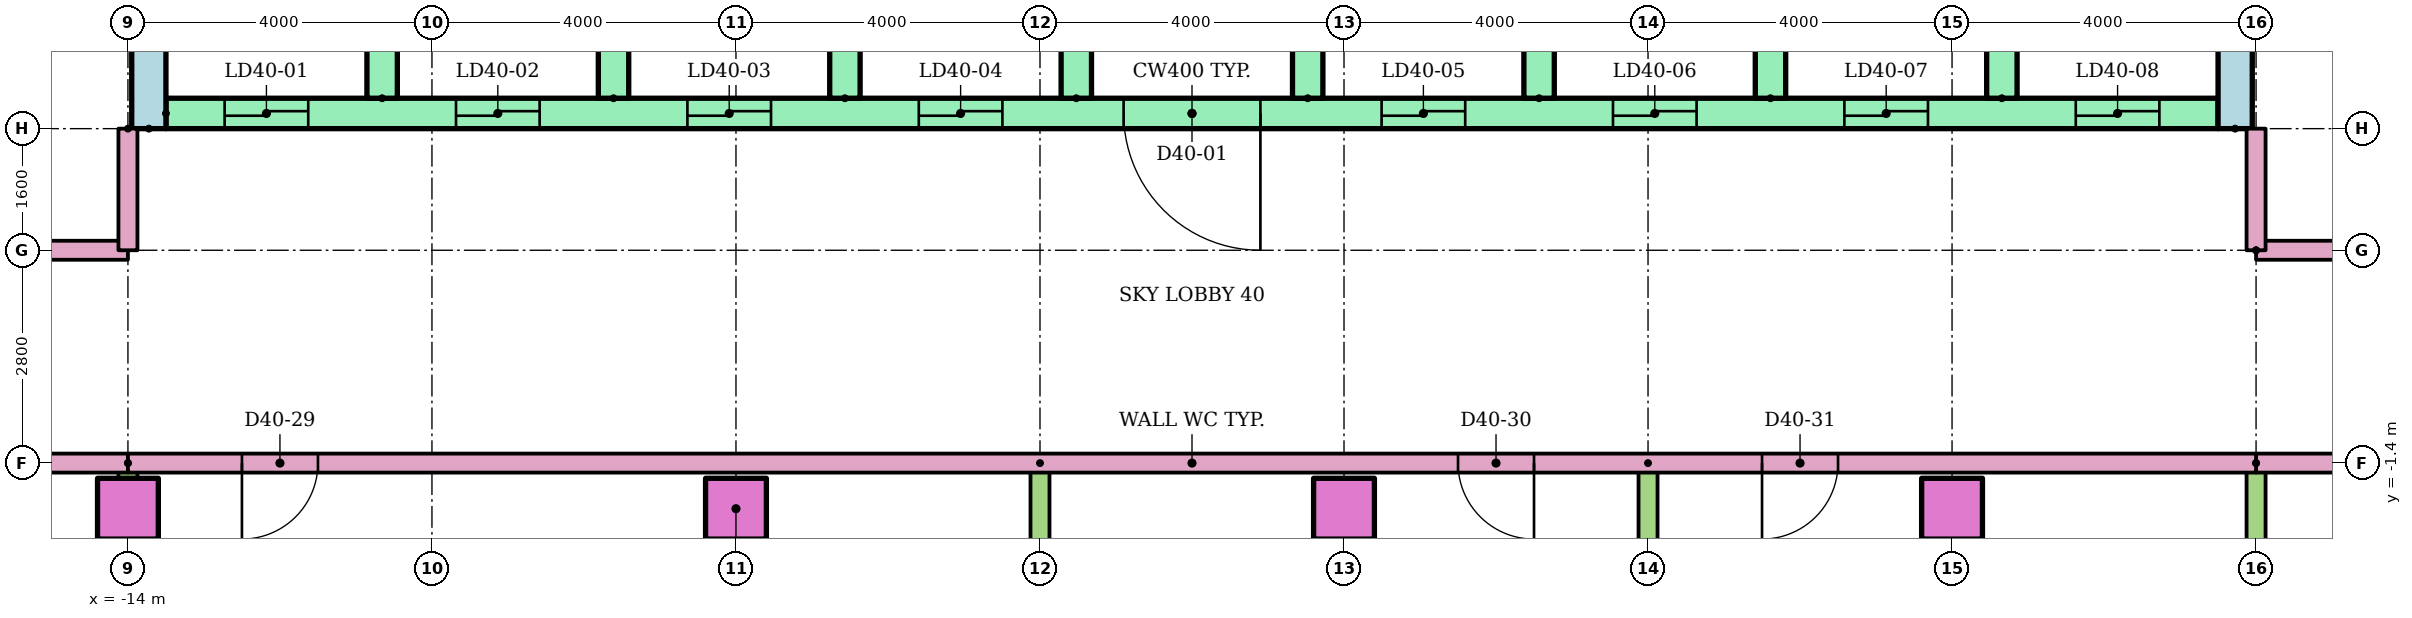
"""IFC4 building model, lengths in metres.
Left out: names, types, materials, properties, quantities, classifications, styles, units other than length and angle.
Written with IfcOpenShell. Run it as: python <this file> out.ifc"""

import sys

from ifc_helpers import new_model, si_unit, direction, frame, frame_2d, origin, origin_2d, place, context, subcontext, project, spatial, rectangle, extrude, element, fill, save


model = new_model("IFC4")
c1 = context("Model", 3, precision=1e-05, world=origin(), true_north=direction((0.0, 1.0)))
c2 = subcontext(c1, "Body", "Model", "MODEL_VIEW")
j1 = project(units=[si_unit("LENGTHUNIT", "METRE"), si_unit("PLANEANGLEUNIT", "RADIAN")], contexts=[c1])
p1 = place(None, origin())
s1 = spatial("IfcSite", under=j1, at=p1, CompositionType="ELEMENT")
p2 = place(p1, origin())
s2 = spatial("IfcBuilding", under=s1, at=p2, CompositionType="ELEMENT")
p3 = place(p2, frame((0.0, 0.0, 151.8)))
s3 = spatial("IfcBuildingStorey", under=s2, at=p3, CompositionType="ELEMENT", Elevation=151.8)
for number, where in (
    (1, (-14.0, -2.0, 0.0)),
    (2, (-6.0, -2.0, 0.0)),
    (3, (2.0, -2.0, 0.0)),
    (4, (10.0, -2.0, 0.0)),
):
    element("IfcColumn", number, at=place(p3, frame(where)), inside=s3, PredefinedType="COLUMN", context=c2, shape_type="SweptSolid", body=[
        extrude(rectangle(XDim=0.8, YDim=0.8, at=origin_2d()), origin(), (0.0, 0.0, 1.0), 9.6),
    ])
for number, where, z_axis, x_axis in (
    (5, (-13.725, 3.0, 0.0), (0.0, 0.0, 1.0), (0.0, 1.0, 0.0)),
    (6, (13.725, 3.0, 0.0), (0.0, 0.0, 1.0), (0.0, 1.0, 0.0)),
):
    element("IfcWall", number, at=place(p3, frame(where, z_axis=z_axis, x_axis=x_axis)), inside=s3, PredefinedType="SHEAR", context=c2, shape_type="SweptSolid", body=[
        extrude(rectangle(XDim=17.0, YDim=0.45, at=frame_2d((8.5, 0.0))), origin(), (0.0, 0.0, 1.0), 8.8),
    ])
p4 = place(p3, frame((-13.5, 3.2, 0.0)))
e7 = element("IfcWall", 7, at=p4, inside=s3, PredefinedType="SHEAR", context=c2, shape_type="SweptSolid", body=[
    extrude(rectangle(XDim=27.0, YDim=0.4, at=frame_2d((13.5, 0.0))), origin(), (0.0, 0.0, 1.0), 8.8),
])
p5 = place(p4, frame((0.772, 0.0, 0.0)))
e8 = element("IfcOpeningElement", 8, at=p5, cuts=e7, PredefinedType="OPENING", context=c2, shape_type="SweptSolid", body=[
    extrude(rectangle(XDim=1.1, YDim=2.1, at=frame_2d((0.55, 1.05))), frame((0.0, 0.21, 0.0), z_axis=(0.0, -1.0, 0.0), x_axis=(1.0, 0.0, 0.0)), (0.0, 0.0, 1.0), 0.42),
])
p6 = place(p4, frame((3.817, 0.0, 0.0)))
e9 = element("IfcOpeningElement", 9, at=p6, cuts=e7, PredefinedType="OPENING", context=c2, shape_type="SweptSolid", body=[
    extrude(rectangle(XDim=1.1, YDim=2.1, at=frame_2d((0.55, 1.05))), frame((0.0, 0.21, 0.0), z_axis=(0.0, -1.0, 0.0), x_axis=(1.0, 0.0, 0.0)), (0.0, 0.0, 1.0), 0.42),
])
p7 = place(p4, frame((6.861, 0.0, 0.0)))
e10 = element("IfcOpeningElement", 10, at=p7, cuts=e7, PredefinedType="OPENING", context=c2, shape_type="SweptSolid", body=[
    extrude(rectangle(XDim=1.1, YDim=2.1, at=frame_2d((0.55, 1.05))), frame((0.0, 0.21, 0.0), z_axis=(0.0, -1.0, 0.0), x_axis=(1.0, 0.0, 0.0)), (0.0, 0.0, 1.0), 0.42),
])
p8 = place(p4, frame((9.906, 0.0, 0.0)))
e11 = element("IfcOpeningElement", 11, at=p8, cuts=e7, PredefinedType="OPENING", context=c2, shape_type="SweptSolid", body=[
    extrude(rectangle(XDim=1.1, YDim=2.1, at=frame_2d((0.55, 1.05))), frame((0.0, 0.21, 0.0), z_axis=(0.0, -1.0, 0.0), x_axis=(1.0, 0.0, 0.0)), (0.0, 0.0, 1.0), 0.42),
])
p9 = place(p4, frame((15.994, 0.0, 0.0)))
e12 = element("IfcOpeningElement", 12, at=p9, cuts=e7, PredefinedType="OPENING", context=c2, shape_type="SweptSolid", body=[
    extrude(rectangle(XDim=1.1, YDim=2.1, at=frame_2d((0.55, 1.05))), frame((0.0, 0.21, 0.0), z_axis=(0.0, -1.0, 0.0), x_axis=(1.0, 0.0, 0.0)), (0.0, 0.0, 1.0), 0.42),
])
p10 = place(p4, frame((19.039, 0.0, 0.0)))
e13 = element("IfcOpeningElement", 13, at=p10, cuts=e7, PredefinedType="OPENING", context=c2, shape_type="SweptSolid", body=[
    extrude(rectangle(XDim=1.1, YDim=2.1, at=frame_2d((0.55, 1.05))), frame((0.0, 0.21, 0.0), z_axis=(0.0, -1.0, 0.0), x_axis=(1.0, 0.0, 0.0)), (0.0, 0.0, 1.0), 0.42),
])
p11 = place(p4, frame((22.083, 0.0, 0.0)))
e14 = element("IfcOpeningElement", 14, at=p11, cuts=e7, PredefinedType="OPENING", context=c2, shape_type="SweptSolid", body=[
    extrude(rectangle(XDim=1.1, YDim=2.1, at=frame_2d((0.55, 1.05))), frame((0.0, 0.21, 0.0), z_axis=(0.0, -1.0, 0.0), x_axis=(1.0, 0.0, 0.0)), (0.0, 0.0, 1.0), 0.42),
])
p12 = place(p4, frame((25.128, 0.0, 0.0)))
e15 = element("IfcOpeningElement", 15, at=p12, cuts=e7, PredefinedType="OPENING", context=c2, shape_type="SweptSolid", body=[
    extrude(rectangle(XDim=1.1, YDim=2.1, at=frame_2d((0.55, 1.05))), frame((0.0, 0.21, 0.0), z_axis=(0.0, -1.0, 0.0), x_axis=(1.0, 0.0, 0.0)), (0.0, 0.0, 1.0), 0.42),
])
p13 = place(p4, frame((12.6, 0.0, 0.0)))
e16 = element("IfcOpeningElement", 16, at=p13, cuts=e7, PredefinedType="OPENING", context=c2, shape_type="SweptSolid", body=[
    extrude(rectangle(XDim=1.8, YDim=2.1, at=frame_2d((0.9, 1.05))), frame((0.0, 0.21, 0.0), z_axis=(0.0, -1.0, 0.0), x_axis=(1.0, 0.0, 0.0)), (0.0, 0.0, 1.0), 0.42),
])
for number, where, z_axis, x_axis in (
    (17, (-10.656, 3.4, 0.0), (0.0, 0.0, 1.0), (0.0, 1.0, 0.0)),
    (18, (-7.611, 3.4, 0.0), (0.0, 0.0, 1.0), (0.0, 1.0, 0.0)),
    (19, (-4.567, 3.4, 0.0), (0.0, 0.0, 1.0), (0.0, 1.0, 0.0)),
    (20, (-1.522, 3.4, 0.0), (0.0, 0.0, 1.0), (0.0, 1.0, 0.0)),
    (21, (1.522, 3.4, 0.0), (0.0, 0.0, 1.0), (0.0, 1.0, 0.0)),
    (22, (4.567, 3.4, 0.0), (0.0, 0.0, 1.0), (0.0, 1.0, 0.0)),
    (23, (7.611, 3.4, 0.0), (0.0, 0.0, 1.0), (0.0, 1.0, 0.0)),
    (24, (10.656, 3.4, 0.0), (0.0, 0.0, 1.0), (0.0, 1.0, 0.0)),
):
    element("IfcWall", number, at=place(p3, frame(where, z_axis=z_axis, x_axis=x_axis)), inside=s3, PredefinedType="SHEAR", context=c2, shape_type="SweptSolid", body=[
        extrude(rectangle(XDim=3.0, YDim=0.4, at=frame_2d((1.5, 0.0))), origin(), (0.0, 0.0, 1.0), 8.8),
    ])
p14 = place(p3, frame((-14.0, -1.4, 0.0), z_axis=(0.0, 0.0, 1.0), x_axis=(-1.0, 0.0, 0.0)))
e25 = element("IfcWall", 25, at=p14, inside=s3, PredefinedType="PARTITIONING", context=c2, shape_type="SweptSolid", body=[
    extrude(rectangle(XDim=15.0, YDim=0.25, at=frame_2d((7.5, 0.0))), origin(), (0.0, 0.0, 1.0), 8.8),
])
p15 = place(p14, frame((1.5, 0.0, 0.0)))
e26 = element("IfcOpeningElement", 26, at=p15, cuts=e25, PredefinedType="OPENING", context=c2, shape_type="SweptSolid", body=[
    extrude(rectangle(XDim=1.0, YDim=2.1, at=frame_2d((0.5, 1.05))), frame((0.0, 0.135, 0.0), z_axis=(0.0, -1.0, 0.0), x_axis=(1.0, 0.0, 0.0)), (0.0, 0.0, 1.0), 0.27),
])
p16 = place(p14, frame((8.45, 0.0, 0.0)))
e27 = element("IfcOpeningElement", 27, at=p16, cuts=e25, PredefinedType="OPENING", context=c2, shape_type="SweptSolid", body=[
    extrude(rectangle(XDim=0.9, YDim=2.1, at=frame_2d((0.45, 1.05))), frame((0.0, 0.135, 0.0), z_axis=(0.0, -1.0, 0.0), x_axis=(1.0, 0.0, 0.0)), (0.0, 0.0, 1.0), 0.27),
])
p17 = place(p14, frame((13.5, 0.0, 0.0)))
e28 = element("IfcOpeningElement", 28, at=p17, cuts=e25, PredefinedType="OPENING", context=c2, shape_type="SweptSolid", body=[
    extrude(rectangle(XDim=1.0, YDim=2.1, at=frame_2d((0.5, 1.05))), frame((0.0, 0.135, 0.0), z_axis=(0.0, -1.0, 0.0), x_axis=(1.0, 0.0, 0.0)), (0.0, 0.0, 1.0), 0.27),
])
p18 = place(p3, frame((-14.0, -1.4, 0.0), z_axis=(0.0, 0.0, 1.0), x_axis=(0.0, -1.0, 0.0)))
e29 = element("IfcWall", 29, at=p18, inside=s3, PredefinedType="PARTITIONING", context=c2, shape_type="SweptSolid", body=[
    extrude(rectangle(XDim=14.921, YDim=0.25, at=frame_2d((7.46, 0.0))), origin(), (0.0, 0.0, 1.0), 8.8),
])
p19 = place(p3, frame((-29.0, 1.4, 0.0)))
e30 = element("IfcWall", 30, at=p19, inside=s3, PredefinedType="PARTITIONING", context=c2, shape_type="SweptSolid", body=[
    extrude(rectangle(XDim=15.0, YDim=0.25, at=frame_2d((7.5, 0.0))), origin(), (0.0, 0.0, 1.0), 8.8),
])
p20 = place(p19, frame((12.5, 0.0, 0.0)))
e31 = element("IfcOpeningElement", 31, at=p20, cuts=e30, PredefinedType="OPENING", context=c2, shape_type="SweptSolid", body=[
    extrude(rectangle(XDim=1.0, YDim=2.1, at=frame_2d((0.5, 1.05))), frame((0.0, 0.135, 0.0), z_axis=(0.0, -1.0, 0.0), x_axis=(1.0, 0.0, 0.0)), (0.0, 0.0, 1.0), 0.27),
])
p21 = place(p19, frame((0.5, 0.0, 0.0)))
e32 = element("IfcOpeningElement", 32, at=p21, cuts=e30, PredefinedType="OPENING", context=c2, shape_type="SweptSolid", body=[
    extrude(rectangle(XDim=1.0, YDim=2.1, at=frame_2d((0.5, 1.05))), frame((0.0, 0.135, 0.0), z_axis=(0.0, -1.0, 0.0), x_axis=(1.0, 0.0, 0.0)), (0.0, 0.0, 1.0), 0.27),
])
p22 = place(p3, frame((29.0, -1.4, 0.0), z_axis=(0.0, 0.0, 1.0), x_axis=(-1.0, 0.0, 0.0)))
e33 = element("IfcWall", 33, at=p22, inside=s3, PredefinedType="PARTITIONING", context=c2, shape_type="SweptSolid", body=[
    extrude(rectangle(XDim=15.0, YDim=0.25, at=frame_2d((7.5, 0.0))), origin(), (0.0, 0.0, 1.0), 8.8),
])
p23 = place(p22, frame((12.5, 0.0, 0.0)))
e34 = element("IfcOpeningElement", 34, at=p23, cuts=e33, PredefinedType="OPENING", context=c2, shape_type="SweptSolid", body=[
    extrude(rectangle(XDim=1.0, YDim=2.1, at=frame_2d((0.5, 1.05))), frame((0.0, 0.135, 0.0), z_axis=(0.0, -1.0, 0.0), x_axis=(1.0, 0.0, 0.0)), (0.0, 0.0, 1.0), 0.27),
])
p24 = place(p22, frame((0.5, 0.0, 0.0)))
e35 = element("IfcOpeningElement", 35, at=p24, cuts=e33, PredefinedType="OPENING", context=c2, shape_type="SweptSolid", body=[
    extrude(rectangle(XDim=1.0, YDim=2.1, at=frame_2d((0.5, 1.05))), frame((0.0, 0.135, 0.0), z_axis=(0.0, -1.0, 0.0), x_axis=(1.0, 0.0, 0.0)), (0.0, 0.0, 1.0), 0.27),
])
p25 = place(p3, frame((14.0, -1.4, 0.0), z_axis=(0.0, 0.0, 1.0), x_axis=(0.0, -1.0, 0.0)))
e36 = element("IfcWall", 36, at=p25, inside=s3, PredefinedType="PARTITIONING", context=c2, shape_type="SweptSolid", body=[
    extrude(rectangle(XDim=14.921, YDim=0.25, at=frame_2d((7.46, 0.0))), origin(), (0.0, 0.0, 1.0), 8.8),
])
p26 = place(p3, frame((14.0, 1.4, 0.0)))
e37 = element("IfcWall", 37, at=p26, inside=s3, PredefinedType="PARTITIONING", context=c2, shape_type="SweptSolid", body=[
    extrude(rectangle(XDim=15.0, YDim=0.25, at=frame_2d((7.5, 0.0))), origin(), (0.0, 0.0, 1.0), 8.8),
])
p27 = place(p26, frame((1.5, 0.0, 0.0)))
e38 = element("IfcOpeningElement", 38, at=p27, cuts=e37, PredefinedType="OPENING", context=c2, shape_type="SweptSolid", body=[
    extrude(rectangle(XDim=1.0, YDim=2.1, at=frame_2d((0.5, 1.05))), frame((0.0, 0.135, 0.0), z_axis=(0.0, -1.0, 0.0), x_axis=(1.0, 0.0, 0.0)), (0.0, 0.0, 1.0), 0.27),
])
p28 = place(p26, frame((9.5, 0.0, 0.0)))
e39 = element("IfcOpeningElement", 39, at=p28, cuts=e37, PredefinedType="OPENING", context=c2, shape_type="SweptSolid", body=[
    extrude(rectangle(XDim=1.0, YDim=2.1, at=frame_2d((0.5, 1.05))), frame((0.0, 0.135, 0.0), z_axis=(0.0, -1.0, 0.0), x_axis=(1.0, 0.0, 0.0)), (0.0, 0.0, 1.0), 0.27),
])
for number, where, z_axis, x_axis in (
    (40, (-2.0, -1.4, 0.0), (0.0, 0.0, 1.0), (0.0, -1.0, 0.0)),
    (41, (6.0, -1.4, 0.0), (0.0, 0.0, 1.0), (0.0, -1.0, 0.0)),
):
    element("IfcWall", number, at=place(p3, frame(where, z_axis=z_axis, x_axis=x_axis)), inside=s3, PredefinedType="PARTITIONING", context=c2, shape_type="SweptSolid", body=[
        extrude(rectangle(XDim=14.921, YDim=0.25, at=frame_2d((7.46, 0.0))), origin(), (0.0, 0.0, 1.0), 8.8),
    ])
p29 = place(p3, frame((14.0, -1.4, 0.0), z_axis=(0.0, 0.0, 1.0), x_axis=(-1.0, 0.0, 0.0)))
e42 = element("IfcWall", 42, at=p29, inside=s3, PredefinedType="PARTITIONING", context=c2, shape_type="SweptSolid", body=[
    extrude(rectangle(XDim=28.0, YDim=0.25, at=frame_2d((14.0, 0.0))), origin(), (0.0, 0.0, 1.0), 8.8),
])
p30 = place(p29, frame((25.5, 0.0, 0.0)))
e43 = element("IfcOpeningElement", 43, at=p30, cuts=e42, PredefinedType="OPENING", context=c2, shape_type="SweptSolid", body=[
    extrude(rectangle(XDim=1.0, YDim=2.1, at=frame_2d((0.5, 1.05))), frame((0.0, 0.135, 0.0), z_axis=(0.0, -1.0, 0.0), x_axis=(1.0, 0.0, 0.0)), (0.0, 0.0, 1.0), 0.27),
])
p31 = place(p29, frame((9.5, 0.0, 0.0)))
e44 = element("IfcOpeningElement", 44, at=p31, cuts=e42, PredefinedType="OPENING", context=c2, shape_type="SweptSolid", body=[
    extrude(rectangle(XDim=1.0, YDim=2.1, at=frame_2d((0.5, 1.05))), frame((0.0, 0.135, 0.0), z_axis=(0.0, -1.0, 0.0), x_axis=(1.0, 0.0, 0.0)), (0.0, 0.0, 1.0), 0.27),
])
p32 = place(p29, frame((5.5, 0.0, 0.0)))
e45 = element("IfcOpeningElement", 45, at=p32, cuts=e42, PredefinedType="OPENING", context=c2, shape_type="SweptSolid", body=[
    extrude(rectangle(XDim=1.0, YDim=2.1, at=frame_2d((0.5, 1.05))), frame((0.0, 0.135, 0.0), z_axis=(0.0, -1.0, 0.0), x_axis=(1.0, 0.0, 0.0)), (0.0, 0.0, 1.0), 0.27),
])
for number, where, z_axis, x_axis in (
    (46, (-14.0, 3.0, 0.0), (0.0, 0.0, 1.0), (0.0, -1.0, 0.0)),
    (47, (14.0, 1.4, 0.0), (0.0, 0.0, 1.0), (0.0, 1.0, 0.0)),
):
    element("IfcWall", number, at=place(p3, frame(where, z_axis=z_axis, x_axis=x_axis)), inside=s3, PredefinedType="PARTITIONING", context=c2, shape_type="SweptSolid", body=[
        extrude(rectangle(XDim=1.6, YDim=0.25, at=frame_2d((0.8, 0.0))), origin(), (0.0, 0.0, 1.0), 8.8),
    ])
p33 = place(p5, origin())
e48 = element("IfcDoor", 48, at=p33, inside=s3, OperationType="SLIDING_TO_LEFT", PredefinedType="DOOR", context=c2, shape_type="SweptSolid", body=[
    extrude(rectangle(XDim=1.1, YDim=2.1, at=frame_2d((0.55, 1.05))), frame((0.0, 0.025, 0.0), z_axis=(0.0, -1.0, 0.0), x_axis=(1.0, 0.0, 0.0)), (0.0, 0.0, 1.0), 0.05),
])
fill(e8, e48)
p34 = place(p6, origin())
e49 = element("IfcDoor", 49, at=p34, inside=s3, OperationType="SLIDING_TO_LEFT", PredefinedType="DOOR", context=c2, shape_type="SweptSolid", body=[
    extrude(rectangle(XDim=1.1, YDim=2.1, at=frame_2d((0.55, 1.05))), frame((0.0, 0.025, 0.0), z_axis=(0.0, -1.0, 0.0), x_axis=(1.0, 0.0, 0.0)), (0.0, 0.0, 1.0), 0.05),
])
fill(e9, e49)
p35 = place(p7, origin())
e50 = element("IfcDoor", 50, at=p35, inside=s3, OperationType="SLIDING_TO_LEFT", PredefinedType="DOOR", context=c2, shape_type="SweptSolid", body=[
    extrude(rectangle(XDim=1.1, YDim=2.1, at=frame_2d((0.55, 1.05))), frame((0.0, 0.025, 0.0), z_axis=(0.0, -1.0, 0.0), x_axis=(1.0, 0.0, 0.0)), (0.0, 0.0, 1.0), 0.05),
])
fill(e10, e50)
p36 = place(p8, origin())
e51 = element("IfcDoor", 51, at=p36, inside=s3, OperationType="SLIDING_TO_LEFT", PredefinedType="DOOR", context=c2, shape_type="SweptSolid", body=[
    extrude(rectangle(XDim=1.1, YDim=2.1, at=frame_2d((0.55, 1.05))), frame((0.0, 0.025, 0.0), z_axis=(0.0, -1.0, 0.0), x_axis=(1.0, 0.0, 0.0)), (0.0, 0.0, 1.0), 0.05),
])
fill(e11, e51)
p37 = place(p9, origin())
e52 = element("IfcDoor", 52, at=p37, inside=s3, OperationType="SLIDING_TO_LEFT", PredefinedType="DOOR", context=c2, shape_type="SweptSolid", body=[
    extrude(rectangle(XDim=1.1, YDim=2.1, at=frame_2d((0.55, 1.05))), frame((0.0, 0.025, 0.0), z_axis=(0.0, -1.0, 0.0), x_axis=(1.0, 0.0, 0.0)), (0.0, 0.0, 1.0), 0.05),
])
fill(e12, e52)
p38 = place(p10, origin())
e53 = element("IfcDoor", 53, at=p38, inside=s3, OperationType="SLIDING_TO_LEFT", PredefinedType="DOOR", context=c2, shape_type="SweptSolid", body=[
    extrude(rectangle(XDim=1.1, YDim=2.1, at=frame_2d((0.55, 1.05))), frame((0.0, 0.025, 0.0), z_axis=(0.0, -1.0, 0.0), x_axis=(1.0, 0.0, 0.0)), (0.0, 0.0, 1.0), 0.05),
])
fill(e13, e53)
p39 = place(p11, origin())
e54 = element("IfcDoor", 54, at=p39, inside=s3, OperationType="SLIDING_TO_LEFT", PredefinedType="DOOR", context=c2, shape_type="SweptSolid", body=[
    extrude(rectangle(XDim=1.1, YDim=2.1, at=frame_2d((0.55, 1.05))), frame((0.0, 0.025, 0.0), z_axis=(0.0, -1.0, 0.0), x_axis=(1.0, 0.0, 0.0)), (0.0, 0.0, 1.0), 0.05),
])
fill(e14, e54)
p40 = place(p12, origin())
e55 = element("IfcDoor", 55, at=p40, inside=s3, OperationType="SLIDING_TO_LEFT", PredefinedType="DOOR", context=c2, shape_type="SweptSolid", body=[
    extrude(rectangle(XDim=1.1, YDim=2.1, at=frame_2d((0.55, 1.05))), frame((0.0, 0.025, 0.0), z_axis=(0.0, -1.0, 0.0), x_axis=(1.0, 0.0, 0.0)), (0.0, 0.0, 1.0), 0.05),
])
fill(e15, e55)
p41 = place(p13, frame((1.8, 0.0, 0.0), z_axis=(0.0, 0.0, 1.0), x_axis=(-1.0, 0.0, 0.0)))
e56 = element("IfcDoor", 56, at=p41, inside=s3, OperationType="DOUBLE_DOOR_SINGLE_SWING", PredefinedType="DOOR", context=c2, shape_type="SweptSolid", body=[
    extrude(rectangle(XDim=1.8, YDim=2.1, at=frame_2d((0.9, 1.05))), frame((0.0, 0.025, 0.0), z_axis=(0.0, -1.0, 0.0), x_axis=(1.0, 0.0, 0.0)), (0.0, 0.0, 1.0), 0.05),
])
fill(e16, e56)
p42 = place(p30, origin())
e57 = element("IfcDoor", 57, at=p42, inside=s3, OperationType="SINGLE_SWING_RIGHT", PredefinedType="DOOR", context=c2, shape_type="SweptSolid", body=[
    extrude(rectangle(XDim=1.0, YDim=2.1, at=frame_2d((0.5, 1.05))), frame((0.0, 0.025, 0.0), z_axis=(0.0, -1.0, 0.0), x_axis=(1.0, 0.0, 0.0)), (0.0, 0.0, 1.0), 0.05),
])
fill(e43, e57)
p43 = place(p31, origin())
e58 = element("IfcDoor", 58, at=p43, inside=s3, OperationType="SINGLE_SWING_LEFT", PredefinedType="DOOR", context=c2, shape_type="SweptSolid", body=[
    extrude(rectangle(XDim=1.0, YDim=2.1, at=frame_2d((0.5, 1.05))), frame((0.0, 0.025, 0.0), z_axis=(0.0, -1.0, 0.0), x_axis=(1.0, 0.0, 0.0)), (0.0, 0.0, 1.0), 0.05),
])
fill(e44, e58)
p44 = place(p32, origin())
e59 = element("IfcDoor", 59, at=p44, inside=s3, OperationType="SINGLE_SWING_RIGHT", PredefinedType="DOOR", context=c2, shape_type="SweptSolid", body=[
    extrude(rectangle(XDim=1.0, YDim=2.1, at=frame_2d((0.5, 1.05))), frame((0.0, 0.025, 0.0), z_axis=(0.0, -1.0, 0.0), x_axis=(1.0, 0.0, 0.0)), (0.0, 0.0, 1.0), 0.05),
])
fill(e45, e59)
save(model, sys.argv[1])
